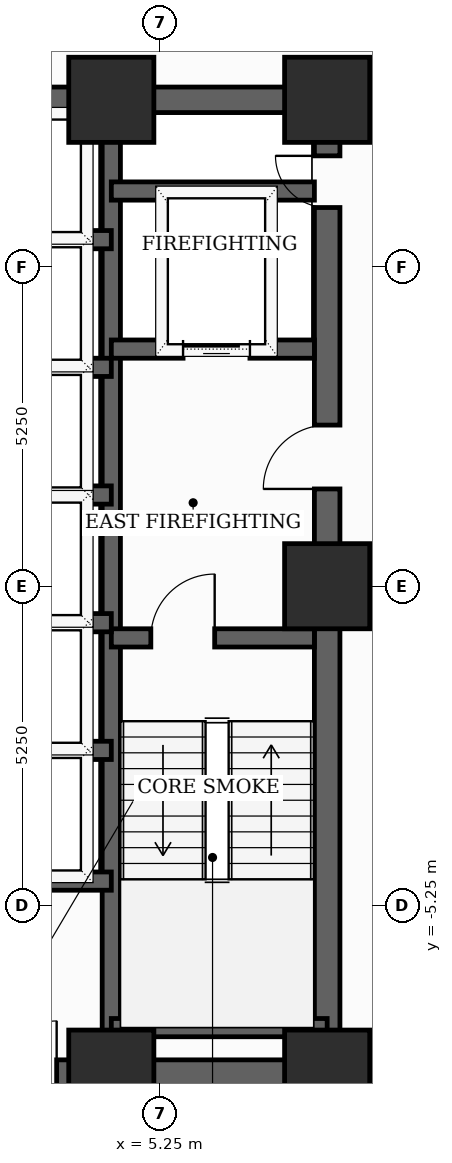
"""IFC4 building model, lengths in metres.
Left out: names, types, materials, properties, quantities, classifications, styles, units other than length and angle.
Written with IfcOpenShell. Run it as: python <this file> out.ifc"""

import sys

from ifc_helpers import new_model, si_unit, direction, frame, frame_2d, origin, origin_2d, place, context, subcontext, project, spatial, rectangle, extrude, element, fill, save


model = new_model("IFC4")
c1 = context("Model", 3, precision=1e-05, world=origin(), true_north=direction((0.0, 1.0)))
c2 = subcontext(c1, "Body", "Model", "MODEL_VIEW")
j1 = project(units=[si_unit("LENGTHUNIT", "METRE"), si_unit("PLANEANGLEUNIT", "RADIAN")], contexts=[c1])
p1 = place(None, origin())
s1 = spatial("IfcSite", under=j1, at=p1, CompositionType="ELEMENT")
p2 = place(p1, origin())
s2 = spatial("IfcBuilding", under=s1, at=p2, CompositionType="ELEMENT")
p3 = place(p2, frame((0.0, 0.0, 180.5)))
s3 = spatial("IfcBuildingStorey", under=s2, at=p3, CompositionType="ELEMENT", Elevation=180.5)
for number, where, z_axis, x_axis in (
    (1, (4.45, -8.0, 0.0), (0.0, 0.0, 1.0), (1.0, 0.0, 0.0)),
    (2, (8.0, -8.0, 0.0), (0.0, 0.0, 1.0), (1.0, 0.0, 0.0)),
    (3, (8.0, 0.0, 0.0), (0.0, 0.0, 1.0), (1.0, 0.0, 0.0)),
    (4, (8.0, 8.0, 0.0), (0.0, 0.0, 1.0), (1.0, 0.0, 0.0)),
    (5, (4.45, 8.0, 0.0), (0.0, 0.0, 1.0), (1.0, 0.0, 0.0)),
):
    element("IfcColumn", number, at=place(p3, frame(where, z_axis=z_axis, x_axis=x_axis)), inside=s3, PredefinedType="COLUMN", context=c2, shape_type="SweptSolid", body=[
        extrude(rectangle(XDim=1.4, YDim=1.4, at=origin_2d()), origin(), (0.0, 0.0, 1.0), 3.7),
    ])
p4 = place(p3, frame((8.0, -8.0, 0.0), z_axis=(0.0, 0.0, 1.0), x_axis=(0.0, 1.0, 0.0)))
e6 = element("IfcWall", 6, at=p4, inside=s3, PredefinedType="SHEAR", context=c2, shape_type="SweptSolid", body=[
    extrude(rectangle(XDim=16.0, YDim=0.42, at=frame_2d((8.0, 0.0))), origin(), (0.0, 0.0, 1.0), 3.5),
])
p5 = place(p4, frame((9.6, 0.0, 0.0)))
e7 = element("IfcOpeningElement", 7, at=p5, cuts=e6, PredefinedType="OPENING", context=c2, shape_type="SweptSolid", body=[
    extrude(rectangle(XDim=1.05, YDim=2.15, at=frame_2d((0.525, 1.075))), frame((0.0, 0.22, 0.0), z_axis=(0.0, -1.0, 0.0), x_axis=(1.0, 0.0, 0.0)), (0.0, 0.0, 1.0), 0.44),
])
p6 = place(p4, frame((14.229, 0.0, 0.0)))
e8 = element("IfcOpeningElement", 8, at=p6, cuts=e6, PredefinedType="OPENING", context=c2, shape_type="SweptSolid", body=[
    extrude(rectangle(XDim=0.85, YDim=2.02, at=frame_2d((0.425, 1.01))), frame((0.0, 0.22, 0.0), z_axis=(0.0, -1.0, 0.0), x_axis=(1.0, 0.0, 0.0)), (0.0, 0.0, 1.0), 0.44),
])
p7 = place(p3, frame((-8.0, -8.0, 0.0), z_axis=(0.0, 0.0, 1.0), x_axis=(1.0, 0.0, 0.0)))
e9 = element("IfcWall", 9, at=p7, inside=s3, PredefinedType="SHEAR", context=c2, shape_type="SweptSolid", body=[
    extrude(rectangle(XDim=16.0, YDim=0.42, at=frame_2d((8.0, 0.0))), origin(), (0.0, 0.0, 1.0), 3.5),
])
p8 = place(p7, frame((4.449, 0.0, 0.0)))
e10 = element("IfcOpeningElement", 10, at=p8, cuts=e9, PredefinedType="OPENING", context=c2, shape_type="SweptSolid", body=[
    extrude(rectangle(XDim=0.85, YDim=2.02, at=frame_2d((0.425, 1.01))), frame((0.0, 0.22, 0.0), z_axis=(0.0, -1.0, 0.0), x_axis=(1.0, 0.0, 0.0)), (0.0, 0.0, 1.0), 0.44),
])
p9 = place(p7, frame((6.49, 0.0, 0.0)))
e11 = element("IfcOpeningElement", 11, at=p9, cuts=e9, PredefinedType="OPENING", context=c2, shape_type="SweptSolid", body=[
    extrude(rectangle(XDim=0.85, YDim=2.02, at=frame_2d((0.425, 1.01))), frame((0.0, 0.22, 0.0), z_axis=(0.0, -1.0, 0.0), x_axis=(1.0, 0.0, 0.0)), (0.0, 0.0, 1.0), 0.44),
])
p10 = place(p7, frame((8.69, 0.0, 0.0)))
e12 = element("IfcOpeningElement", 12, at=p10, cuts=e9, PredefinedType="OPENING", context=c2, shape_type="SweptSolid", body=[
    extrude(rectangle(XDim=0.85, YDim=2.02, at=frame_2d((0.425, 1.01))), frame((0.0, 0.22, 0.0), z_axis=(0.0, -1.0, 0.0), x_axis=(1.0, 0.0, 0.0)), (0.0, 0.0, 1.0), 0.44),
])
p11 = place(p7, frame((10.701, 0.0, 0.0)))
e13 = element("IfcOpeningElement", 13, at=p11, cuts=e9, PredefinedType="OPENING", context=c2, shape_type="SweptSolid", body=[
    extrude(rectangle(XDim=0.85, YDim=2.02, at=frame_2d((0.425, 1.01))), frame((0.0, 0.22, 0.0), z_axis=(0.0, -1.0, 0.0), x_axis=(1.0, 0.0, 0.0)), (0.0, 0.0, 1.0), 0.44),
])
p12 = place(p3, frame((-8.0, 8.0, 0.0), z_axis=(0.0, 0.0, 1.0), x_axis=(1.0, 0.0, 0.0)))
e14 = element("IfcWall", 14, at=p12, inside=s3, PredefinedType="SHEAR", context=c2, shape_type="SweptSolid", body=[
    extrude(rectangle(XDim=16.0, YDim=0.42, at=frame_2d((8.0, 0.0))), origin(), (0.0, 0.0, 1.0), 3.5),
])
p13 = place(p12, frame((7.1, 0.0, 0.0)))
e15 = element("IfcOpeningElement", 15, at=p13, cuts=e14, PredefinedType="OPENING", context=c2, shape_type="SweptSolid", body=[
    extrude(rectangle(XDim=1.8, YDim=2.15, at=frame_2d((0.9, 1.075))), frame((0.0, 0.22, 0.0), z_axis=(0.0, -1.0, 0.0), x_axis=(1.0, 0.0, 0.0)), (0.0, 0.0, 1.0), 0.44),
])
p14 = place(p3, frame((4.45, -7.79, 0.0), z_axis=(0.0, 0.0, 1.0), x_axis=(0.0, 1.0, 0.0)))
e16 = element("IfcWall", 16, at=p14, inside=s3, PredefinedType="SHEAR", context=c2, shape_type="SweptSolid", body=[
    extrude(rectangle(XDim=15.58, YDim=0.3, at=frame_2d((7.79, 0.0))), origin(), (0.0, 0.0, 1.0), 3.5),
])
p15 = place(p3, frame((4.45, -0.85, 0.0), z_axis=(0.0, 0.0, 1.0), x_axis=(1.0, 0.0, 0.0)))
e17 = element("IfcWall", 17, at=p15, inside=s3, PredefinedType="SHEAR", context=c2, shape_type="SweptSolid", body=[
    extrude(rectangle(XDim=3.34, YDim=0.3, at=frame_2d((1.67, 0.0))), origin(), (0.0, 0.0, 1.0), 3.5),
])
p16 = place(p15, frame((0.65, 0.0, 0.0)))
e18 = element("IfcOpeningElement", 18, at=p16, cuts=e17, PredefinedType="OPENING", context=c2, shape_type="SweptSolid", body=[
    extrude(rectangle(XDim=1.05, YDim=2.15, at=frame_2d((0.525, 1.075))), frame((0.0, 0.16, 0.0), z_axis=(0.0, -1.0, 0.0), x_axis=(1.0, 0.0, 0.0)), (0.0, 0.0, 1.0), 0.32),
])
p17 = place(p3, frame((4.45, -7.26, 0.0), z_axis=(0.0, 0.0, 1.0), x_axis=(1.0, 0.0, 0.0)))
e19 = element("IfcWall", 19, at=p17, inside=s3, PredefinedType="SHEAR", context=c2, shape_type="SweptSolid", body=[
    extrude(rectangle(XDim=3.55, YDim=0.3, at=frame_2d((1.775, 0.0))), origin(), (0.0, 0.0, 1.0), 3.5),
])
p18 = place(p3, frame((4.45, 3.9, 0.0), z_axis=(0.0, 0.0, 1.0), x_axis=(1.0, 0.0, 0.0)))
e20 = element("IfcWall", 20, at=p18, inside=s3, PredefinedType="SHEAR", context=c2, shape_type="SweptSolid", body=[
    extrude(rectangle(XDim=3.34, YDim=0.3, at=frame_2d((1.67, 0.0))), origin(), (0.0, 0.0, 1.0), 3.5),
])
p19 = place(p18, frame((1.18, 0.0, 0.0)))
e21 = element("IfcOpeningElement", 21, at=p19, cuts=e20, PredefinedType="OPENING", context=c2, shape_type="SweptSolid", body=[
    extrude(rectangle(XDim=1.1, YDim=2.1, at=frame_2d((0.55, 1.05))), frame((0.0, 0.16, 0.0), z_axis=(0.0, -1.0, 0.0), x_axis=(1.0, 0.0, 0.0)), (0.0, 0.0, 1.0), 0.32),
])
p20 = place(p3, frame((4.45, 6.5, 0.0), z_axis=(0.0, 0.0, 1.0), x_axis=(1.0, 0.0, 0.0)))
e22 = element("IfcWall", 22, at=p20, inside=s3, PredefinedType="SHEAR", context=c2, shape_type="SweptSolid", body=[
    extrude(rectangle(XDim=3.34, YDim=0.3, at=frame_2d((1.67, 0.0))), origin(), (0.0, 0.0, 1.0), 3.5),
])
p21 = place(p3, frame((-4.45, -4.85, 0.0), z_axis=(0.0, 0.0, 1.0), x_axis=(1.0, 0.0, 0.0)))
e23 = element("IfcWall", 23, at=p21, inside=s3, PredefinedType="SHEAR", context=c2, shape_type="SweptSolid", body=[
    extrude(rectangle(XDim=8.9, YDim=0.3, at=frame_2d((4.45, 0.0))), origin(), (0.0, 0.0, 1.0), 3.5),
])
for number, where, z_axis, x_axis in (
    (24, (1.68, 1.5, 0.0), (0.0, 0.0, 1.0), (1.0, 0.0, 0.0)),
    (25, (1.68, 3.6, 0.0), (0.0, 0.0, 1.0), (1.0, 0.0, 0.0)),
    (26, (1.68, 5.7, 0.0), (0.0, 0.0, 1.0), (1.0, 0.0, 0.0)),
    (27, (1.68, -2.7, 0.0), (0.0, 0.0, 1.0), (1.0, 0.0, 0.0)),
    (28, (1.68, -0.6, 0.0), (0.0, 0.0, 1.0), (1.0, 0.0, 0.0)),
):
    element("IfcWall", number, at=place(p3, frame(where, z_axis=z_axis, x_axis=x_axis)), inside=s3, PredefinedType="SHEAR", context=c2, shape_type="SweptSolid", body=[
        extrude(rectangle(XDim=2.77, YDim=0.3, at=frame_2d((1.385, 0.0))), origin(), (0.0, 0.0, 1.0), 3.5),
    ])
p22 = place(p5, origin())
e29 = element("IfcDoor", 29, at=p22, inside=s3, OperationType="SINGLE_SWING_LEFT", PredefinedType="DOOR", context=c2, shape_type="SweptSolid", body=[
    extrude(rectangle(XDim=1.05, YDim=2.15, at=frame_2d((0.525, 1.075))), frame((0.0, 0.025, 0.0), z_axis=(0.0, -1.0, 0.0), x_axis=(1.0, 0.0, 0.0)), (0.0, 0.0, 1.0), 0.05),
])
fill(e7, e29)
p23 = place(p6, origin())
e30 = element("IfcDoor", 30, at=p23, inside=s3, OperationType="SINGLE_SWING_RIGHT", PredefinedType="TRAPDOOR", context=c2, shape_type="SweptSolid", body=[
    extrude(rectangle(XDim=0.85, YDim=2.02, at=frame_2d((0.425, 1.01))), frame((0.0, 0.025, 0.0), z_axis=(0.0, -1.0, 0.0), x_axis=(1.0, 0.0, 0.0)), (0.0, 0.0, 1.0), 0.05),
])
fill(e8, e30)
p24 = place(p11, origin())
e31 = element("IfcDoor", 31, at=p24, inside=s3, OperationType="SINGLE_SWING_RIGHT", PredefinedType="TRAPDOOR", context=c2, shape_type="SweptSolid", body=[
    extrude(rectangle(XDim=0.85, YDim=2.02, at=frame_2d((0.425, 1.01))), frame((0.0, 0.025, 0.0), z_axis=(0.0, -1.0, 0.0), x_axis=(1.0, 0.0, 0.0)), (0.0, 0.0, 1.0), 0.05),
])
fill(e13, e31)
p25 = place(p16, origin())
e32 = element("IfcDoor", 32, at=p25, inside=s3, OperationType="SINGLE_SWING_RIGHT", PredefinedType="DOOR", context=c2, shape_type="SweptSolid", body=[
    extrude(rectangle(XDim=1.05, YDim=2.15, at=frame_2d((0.525, 1.075))), frame((0.0, 0.025, 0.0), z_axis=(0.0, -1.0, 0.0), x_axis=(1.0, 0.0, 0.0)), (0.0, 0.0, 1.0), 0.05),
])
fill(e18, e32)
p26 = place(p19, origin())
e33 = element("IfcDoor", 33, at=p26, inside=s3, OperationType="SLIDING_TO_LEFT", PredefinedType="DOOR", context=c2, shape_type="SweptSolid", body=[
    extrude(rectangle(XDim=1.1, YDim=2.1, at=frame_2d((0.55, 1.05))), frame((0.0, 0.025, 0.0), z_axis=(0.0, -1.0, 0.0), x_axis=(1.0, 0.0, 0.0)), (0.0, 0.0, 1.0), 0.05),
])
fill(e21, e33)
save(model, sys.argv[1])
